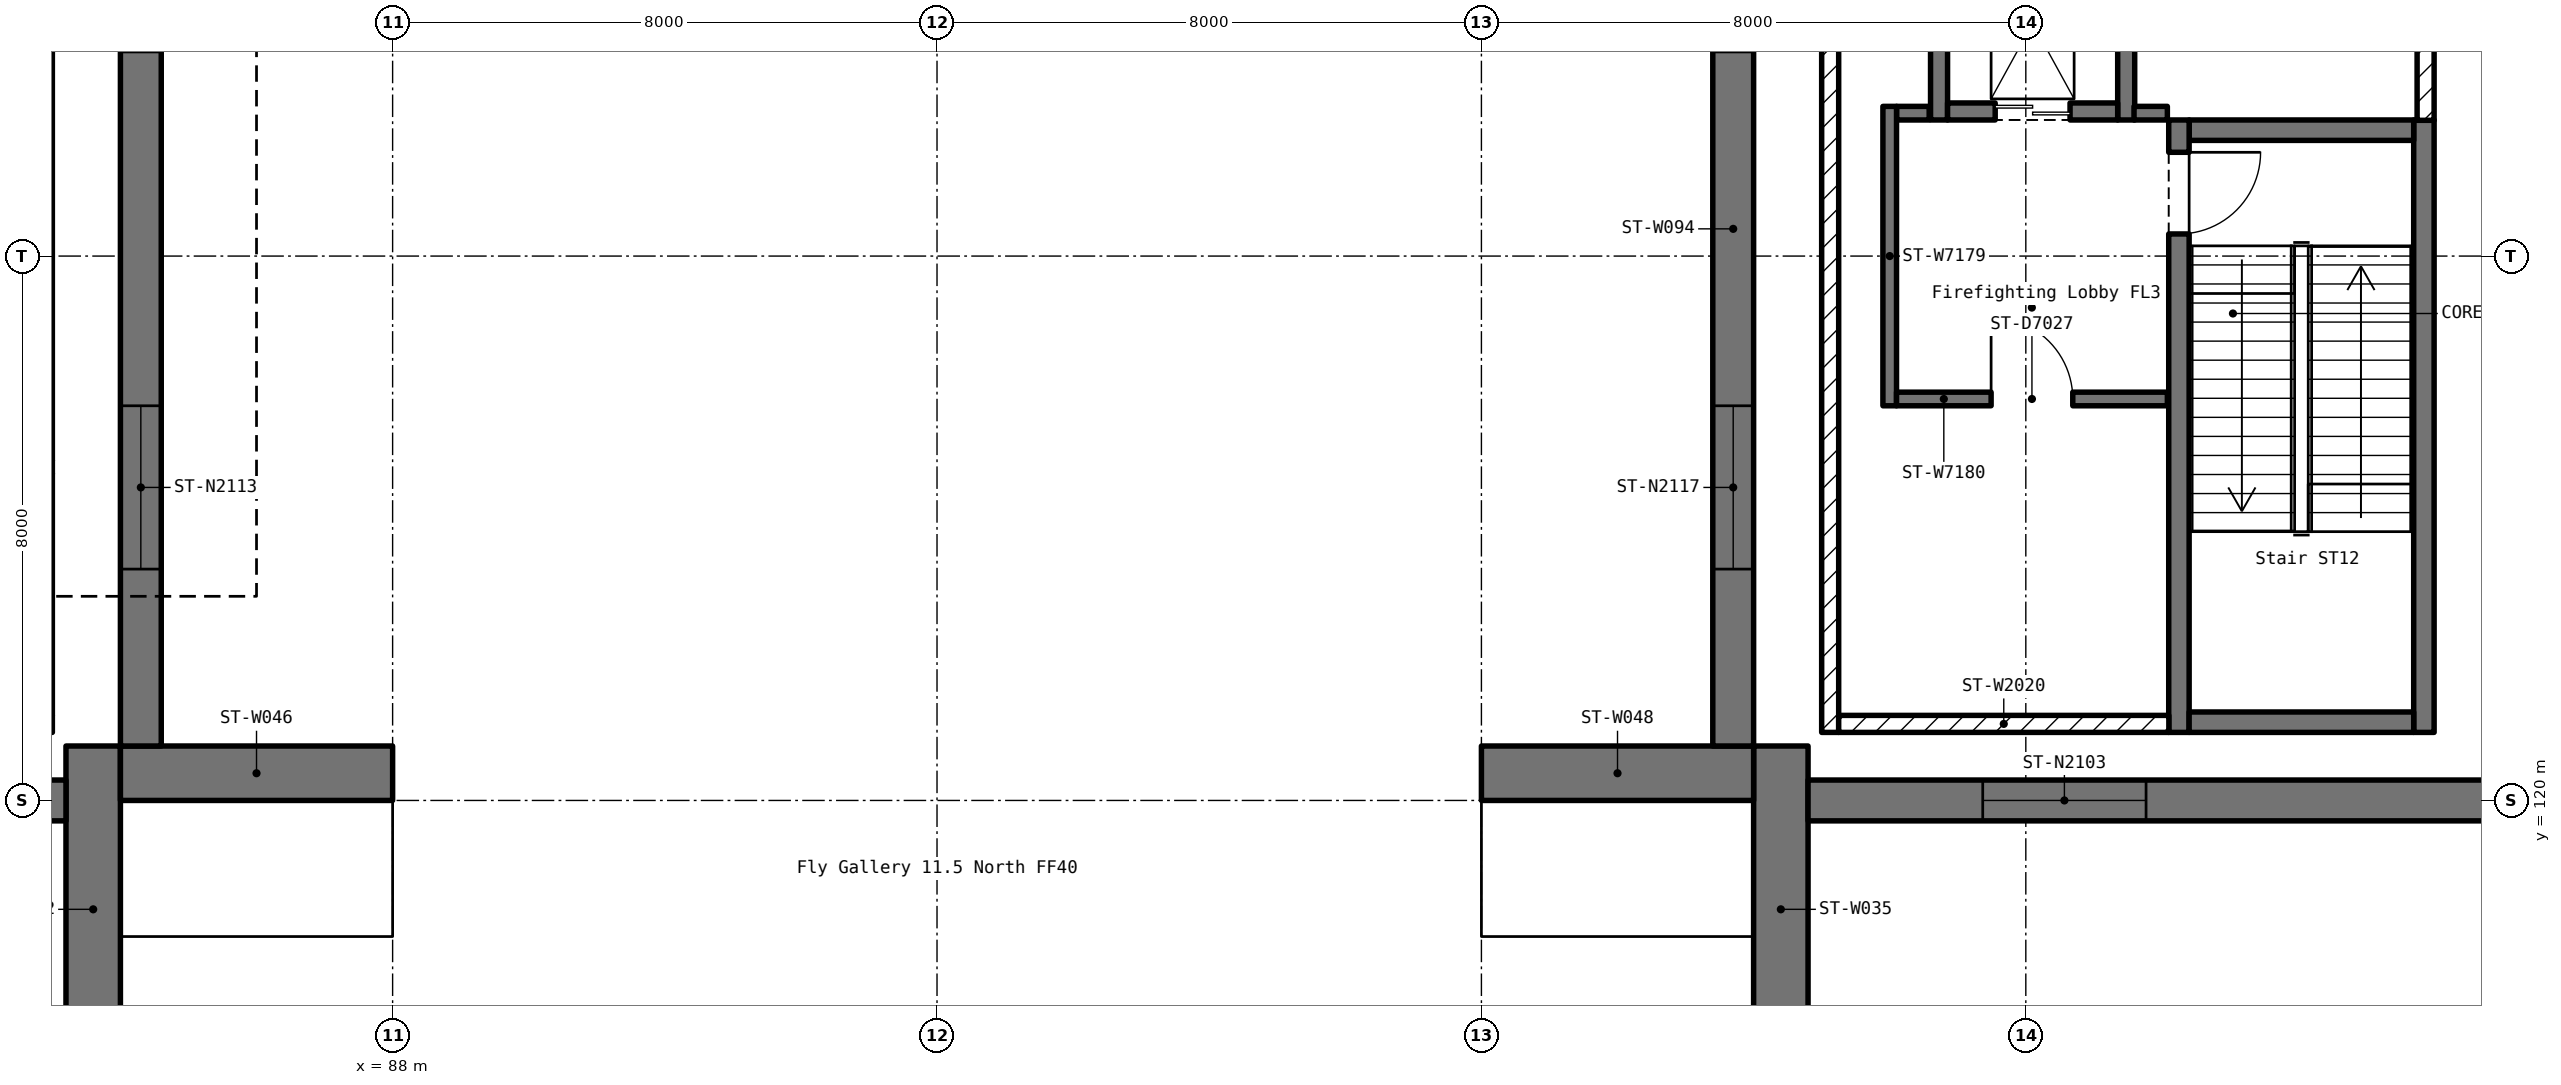
"""IFC4 building model, lengths in metres.
Left out: names, types, materials, properties, quantities, classifications, styles, units other than length and angle.
Written with IfcOpenShell. Run it as: python <this file> out.ifc"""

import sys

from ifc_helpers import new_model, si_unit, direction, frame, frame_2d, origin, place, context, subcontext, project, spatial, rectangle, extrude, element, fill, save


model = new_model("IFC4")
c1 = context("Model", 3, precision=1e-05, world=origin(), true_north=direction((0.0, 1.0)))
c2 = subcontext(c1, "Body", "Model", "MODEL_VIEW")
j1 = project(units=[si_unit("LENGTHUNIT", "METRE"), si_unit("PLANEANGLEUNIT", "RADIAN")], contexts=[c1])
p1 = place(None, origin())
s1 = spatial("IfcSite", under=j1, at=p1, CompositionType="ELEMENT")
p2 = place(p1, origin())
s2 = spatial("IfcBuilding", under=s1, at=p2, CompositionType="ELEMENT")
p3 = place(p2, frame((0.0, 0.0, 11.5)))
s3 = spatial("IfcBuildingStorey", under=s2, at=p3, CompositionType="ELEMENT", Elevation=11.5)
for number, where, z_axis, x_axis in (
    (1, (83.6, 116.0, 0.0), (0.0, 0.0, 1.0), (0.0, 1.0, 0.0)),
    (2, (108.4, 116.0, 0.0), (0.0, 0.0, 1.0), (0.0, 1.0, 0.0)),
):
    element("IfcWall", number, at=place(p3, frame(where, z_axis=z_axis, x_axis=x_axis)), inside=s3, PredefinedType="SHEAR", context=c2, shape_type="SweptSolid", body=[
        extrude(rectangle(XDim=4.8, YDim=0.8, at=frame_2d((2.4, 0.0))), origin(), (0.0, 0.0, 1.0), 5.5),
    ])
p4 = place(p3, frame((84.0, 120.4, 0.0), z_axis=(0.0, 0.0, 1.0), x_axis=(1.0, 0.0, 0.0)))
e3 = element("IfcWall", 3, at=p4, inside=s3, PredefinedType="SHEAR", context=c2, shape_type="SweptSolid", body=[
    extrude(rectangle(XDim=4.0, YDim=0.8, at=frame_2d((2.0, 0.0))), origin(), (0.0, 0.0, 1.0), 5.5),
])
p5 = place(p3, frame((88.0, 120.4, 5.1), z_axis=(0.0, 0.0, 1.0), x_axis=(1.0, 0.0, 0.0)))
e4 = element("IfcWall", 4, at=p5, inside=s3, PredefinedType="SHEAR", context=c2, shape_type="SweptSolid", body=[
    extrude(rectangle(XDim=16.0, YDim=0.8, at=frame_2d((8.0, 0.0))), origin(), (0.0, 0.0, 1.0), 0.4),
])
p6 = place(p3, frame((104.0, 120.4, 0.0), z_axis=(0.0, 0.0, 1.0), x_axis=(1.0, 0.0, 0.0)))
e5 = element("IfcWall", 5, at=p6, inside=s3, PredefinedType="SHEAR", context=c2, shape_type="SweptSolid", body=[
    extrude(rectangle(XDim=4.0, YDim=0.8, at=frame_2d((2.0, 0.0))), origin(), (0.0, 0.0, 1.0), 5.5),
])
p7 = place(p3, frame((60.6, 120.0, 0.0), z_axis=(0.0, 0.0, 1.0), x_axis=(1.0, 0.0, 0.0)))
e6 = element("IfcWall", 6, at=p7, inside=s3, PredefinedType="SHEAR", context=c2, shape_type="SweptSolid", body=[
    extrude(rectangle(XDim=22.6, YDim=0.6, at=frame_2d((11.3, 0.0))), origin(), (0.0, 0.0, 1.0), 5.5),
])
p8 = place(p7, frame((2.567, 0.0, 1.4)))
e7 = element("IfcOpeningElement", 7, at=p8, cuts=e6, PredefinedType="OPENING", context=c2, shape_type="SweptSolid", body=[
    extrude(rectangle(XDim=2.4, YDim=1.0, at=frame_2d((1.2, 0.5))), frame((0.0, 0.312, 0.0), z_axis=(0.0, -1.0, 0.0), x_axis=(1.0, 0.0, 0.0)), (0.0, 0.0, 1.0), 0.624),
])
p9 = place(p7, frame((10.1, 0.0, 1.4)))
e8 = element("IfcOpeningElement", 8, at=p9, cuts=e6, PredefinedType="OPENING", context=c2, shape_type="SweptSolid", body=[
    extrude(rectangle(XDim=2.4, YDim=1.0, at=frame_2d((1.2, 0.5))), frame((0.0, 0.312, 0.0), z_axis=(0.0, -1.0, 0.0), x_axis=(1.0, 0.0, 0.0)), (0.0, 0.0, 1.0), 0.624),
])
p10 = place(p7, frame((17.633, 0.0, 1.4)))
e9 = element("IfcOpeningElement", 9, at=p10, cuts=e6, PredefinedType="OPENING", context=c2, shape_type="SweptSolid", body=[
    extrude(rectangle(XDim=2.4, YDim=1.0, at=frame_2d((1.2, 0.5))), frame((0.0, 0.312, 0.0), z_axis=(0.0, -1.0, 0.0), x_axis=(1.0, 0.0, 0.0)), (0.0, 0.0, 1.0), 0.624),
])
p11 = place(p3, frame((108.8, 120.0, 0.0), z_axis=(0.0, 0.0, 1.0), x_axis=(1.0, 0.0, 0.0)))
e10 = element("IfcWall", 10, at=p11, inside=s3, PredefinedType="SHEAR", context=c2, shape_type="SweptSolid", body=[
    extrude(rectangle(XDim=22.6, YDim=0.6, at=frame_2d((11.3, 0.0))), origin(), (0.0, 0.0, 1.0), 5.5),
])
p12 = place(p11, frame((2.567, 0.0, 1.4)))
e11 = element("IfcOpeningElement", 11, at=p12, cuts=e10, PredefinedType="OPENING", context=c2, shape_type="SweptSolid", body=[
    extrude(rectangle(XDim=2.4, YDim=1.0, at=frame_2d((1.2, 0.5))), frame((0.0, 0.312, 0.0), z_axis=(0.0, -1.0, 0.0), x_axis=(1.0, 0.0, 0.0)), (0.0, 0.0, 1.0), 0.624),
])
p13 = place(p11, frame((10.1, 0.0, 1.4)))
e12 = element("IfcOpeningElement", 12, at=p13, cuts=e10, PredefinedType="OPENING", context=c2, shape_type="SweptSolid", body=[
    extrude(rectangle(XDim=2.4, YDim=1.0, at=frame_2d((1.2, 0.5))), frame((0.0, 0.312, 0.0), z_axis=(0.0, -1.0, 0.0), x_axis=(1.0, 0.0, 0.0)), (0.0, 0.0, 1.0), 0.624),
])
p14 = place(p11, frame((17.633, 0.0, 1.4)))
e13 = element("IfcOpeningElement", 13, at=p14, cuts=e10, PredefinedType="OPENING", context=c2, shape_type="SweptSolid", body=[
    extrude(rectangle(XDim=2.4, YDim=1.0, at=frame_2d((1.2, 0.5))), frame((0.0, 0.312, 0.0), z_axis=(0.0, -1.0, 0.0), x_axis=(1.0, 0.0, 0.0)), (0.0, 0.0, 1.0), 0.624),
])
p15 = place(p3, frame((84.3, 120.8, 0.0), z_axis=(0.0, 0.0, 1.0), x_axis=(0.0, 1.0, 0.0)))
e14 = element("IfcWall", 14, at=p15, inside=s3, PredefinedType="SHEAR", context=c2, shape_type="SweptSolid", body=[
    extrude(rectangle(XDim=15.2, YDim=0.6, at=frame_2d((7.6, 0.0))), origin(), (0.0, 0.0, 1.0), 5.5),
])
p16 = place(p15, frame((2.6, 0.0, 1.4)))
e15 = element("IfcOpeningElement", 15, at=p16, cuts=e14, PredefinedType="OPENING", context=c2, shape_type="SweptSolid", body=[
    extrude(rectangle(XDim=2.4, YDim=1.0, at=frame_2d((1.2, 0.5))), frame((0.0, 0.312, 0.0), z_axis=(0.0, -1.0, 0.0), x_axis=(1.0, 0.0, 0.0)), (0.0, 0.0, 1.0), 0.624),
])
p17 = place(p15, frame((10.2, 0.0, 1.4)))
e16 = element("IfcOpeningElement", 16, at=p17, cuts=e14, PredefinedType="OPENING", context=c2, shape_type="SweptSolid", body=[
    extrude(rectangle(XDim=2.4, YDim=1.0, at=frame_2d((1.2, 0.5))), frame((0.0, 0.312, 0.0), z_axis=(0.0, -1.0, 0.0), x_axis=(1.0, 0.0, 0.0)), (0.0, 0.0, 1.0), 0.624),
])
p18 = place(p3, frame((107.7, 120.8, 0.0), z_axis=(0.0, 0.0, 1.0), x_axis=(0.0, 1.0, 0.0)))
e17 = element("IfcWall", 17, at=p18, inside=s3, PredefinedType="SHEAR", context=c2, shape_type="SweptSolid", body=[
    extrude(rectangle(XDim=15.2, YDim=0.6, at=frame_2d((7.6, 0.0))), origin(), (0.0, 0.0, 1.0), 5.5),
])
p19 = place(p18, frame((2.6, 0.0, 1.4)))
e18 = element("IfcOpeningElement", 18, at=p19, cuts=e17, PredefinedType="OPENING", context=c2, shape_type="SweptSolid", body=[
    extrude(rectangle(XDim=2.4, YDim=1.0, at=frame_2d((1.2, 0.5))), frame((0.0, 0.312, 0.0), z_axis=(0.0, -1.0, 0.0), x_axis=(1.0, 0.0, 0.0)), (0.0, 0.0, 1.0), 0.624),
])
p20 = place(p18, frame((10.2, 0.0, 1.4)))
e19 = element("IfcOpeningElement", 19, at=p20, cuts=e17, PredefinedType="OPENING", context=c2, shape_type="SweptSolid", body=[
    extrude(rectangle(XDim=2.4, YDim=1.0, at=frame_2d((1.2, 0.5))), frame((0.0, 0.312, 0.0), z_axis=(0.0, -1.0, 0.0), x_axis=(1.0, 0.0, 0.0)), (0.0, 0.0, 1.0), 0.624),
])
p21 = place(p3, frame((117.85, 121.0, 0.0), z_axis=(0.0, 0.0, 1.0), x_axis=(0.0, 1.0, 0.0)))
e20 = element("IfcWall", 20, at=p21, inside=s3, PredefinedType="SOLIDWALL", context=c2, shape_type="SweptSolid", body=[
    extrude(rectangle(XDim=9.0, YDim=0.3, at=frame_2d((4.5, 0.0))), origin(), (0.0, 0.0, 1.0), 5.5),
])
p22 = place(p3, frame((117.7, 129.85, 0.0), z_axis=(0.0, 0.0, 1.0), x_axis=(-1.0, 0.0, 0.0)))
e21 = element("IfcWall", 21, at=p22, inside=s3, PredefinedType="SOLIDWALL", context=c2, shape_type="SweptSolid", body=[
    extrude(rectangle(XDim=3.3, YDim=0.3, at=frame_2d((1.65, 0.0))), origin(), (0.0, 0.0, 1.0), 5.5),
])
p23 = place(p3, frame((114.25, 130.0, 0.0), z_axis=(0.0, 0.0, 1.0), x_axis=(0.0, -1.0, 0.0)))
e22 = element("IfcWall", 22, at=p23, inside=s3, PredefinedType="SOLIDWALL", context=c2, shape_type="SweptSolid", body=[
    extrude(rectangle(XDim=9.0, YDim=0.3, at=frame_2d((4.5, 0.0))), origin(), (0.0, 0.0, 1.0), 5.5),
])
p24 = place(p23, frame((0.475, 0.0, 0.0)))
e23 = element("IfcOpeningElement", 23, at=p24, cuts=e22, PredefinedType="OPENING", context=c2, shape_type="SweptSolid", body=[
    extrude(rectangle(XDim=1.2, YDim=2.1, at=frame_2d((0.6, 1.05))), frame((0.0, 0.162, 0.0), z_axis=(0.0, -1.0, 0.0), x_axis=(1.0, 0.0, 0.0)), (0.0, 0.0, 1.0), 0.324),
])
p25 = place(p3, frame((114.4, 121.15, 0.0), z_axis=(0.0, 0.0, 1.0), x_axis=(1.0, 0.0, 0.0)))
e24 = element("IfcWall", 24, at=p25, inside=s3, PredefinedType="SOLIDWALL", context=c2, shape_type="SweptSolid", body=[
    extrude(rectangle(XDim=3.3, YDim=0.3, at=frame_2d((1.65, 0.0))), origin(), (0.0, 0.0, 1.0), 5.5),
])
for number, where, z_axis, x_axis in (
    (25, (113.475, 130.0, 0.0), (0.0, 0.0, 1.0), (0.0, 1.0, 0.0)),
    (26, (110.725, 134.0, 0.0), (0.0, 0.0, 1.0), (0.0, -1.0, 0.0)),
):
    element("IfcWall", number, at=place(p3, frame(where, z_axis=z_axis, x_axis=x_axis)), inside=s3, PredefinedType="SOLIDWALL", context=c2, shape_type="SweptSolid", body=[
        extrude(rectangle(XDim=4.0, YDim=0.25, at=frame_2d((2.0, 0.0))), origin(), (0.0, 0.0, 1.0), 5.5),
    ])
p26 = place(p3, frame((110.85, 130.125, 0.0), z_axis=(0.0, 0.0, 1.0), x_axis=(1.0, 0.0, 0.0)))
e27 = element("IfcWall", 27, at=p26, inside=s3, PredefinedType="SOLIDWALL", context=c2, shape_type="SweptSolid", body=[
    extrude(rectangle(XDim=2.5, YDim=0.25, at=frame_2d((1.25, 0.0))), origin(), (0.0, 0.0, 1.0), 5.5),
])
p27 = place(p26, frame((0.7, 0.0, 0.0)))
e28 = element("IfcOpeningElement", 28, at=p27, cuts=e27, PredefinedType="OPENING", context=c2, shape_type="SweptSolid", body=[
    extrude(rectangle(XDim=1.1, YDim=2.1, at=frame_2d((0.55, 1.05))), frame((0.0, 0.137, 0.0), z_axis=(0.0, -1.0, 0.0), x_axis=(1.0, 0.0, 0.0)), (0.0, 0.0, 1.0), 0.274),
])
p28 = place(p3, frame((114.08, 130.1, 0.0), z_axis=(0.0, 0.0, 1.0), x_axis=(-1.0, 0.0, 0.0)))
e29 = element("IfcWall", 29, at=p28, inside=s3, PredefinedType="PARTITIONING", context=c2, shape_type="SweptSolid", body=[
    extrude(rectangle(XDim=0.49, YDim=0.2, at=frame_2d((0.245, 0.0))), origin(), (0.0, 0.0, 1.0), 5.28),
])
p29 = place(p3, frame((110.58, 130.1, 0.0), z_axis=(0.0, 0.0, 1.0), x_axis=(-1.0, 0.0, 0.0)))
e30 = element("IfcWall", 30, at=p29, inside=s3, PredefinedType="PARTITIONING", context=c2, shape_type="SweptSolid", body=[
    extrude(rectangle(XDim=0.48, YDim=0.2, at=frame_2d((0.24, 0.0))), origin(), (0.0, 0.0, 1.0), 5.28),
])
p30 = place(p3, frame((110.0, 130.2, 0.0), z_axis=(0.0, 0.0, 1.0), x_axis=(0.0, -1.0, 0.0)))
e31 = element("IfcWall", 31, at=p30, inside=s3, PredefinedType="PARTITIONING", context=c2, shape_type="SweptSolid", body=[
    extrude(rectangle(XDim=4.4, YDim=0.2, at=frame_2d((2.2, 0.0))), origin(), (0.0, 0.0, 1.0), 5.28),
])
p31 = place(p3, frame((110.1, 125.9, 0.0), z_axis=(0.0, 0.0, 1.0), x_axis=(1.0, 0.0, 0.0)))
e32 = element("IfcWall", 32, at=p31, inside=s3, PredefinedType="PARTITIONING", context=c2, shape_type="SweptSolid", body=[
    extrude(rectangle(XDim=3.98, YDim=0.2, at=frame_2d((1.99, 0.0))), origin(), (0.0, 0.0, 1.0), 5.28),
])
p32 = place(p31, frame((1.39, 0.0, 0.0)))
e33 = element("IfcOpeningElement", 33, at=p32, cuts=e32, PredefinedType="OPENING", context=c2, shape_type="SweptSolid", body=[
    extrude(rectangle(XDim=1.2, YDim=2.1, at=frame_2d((0.6, 1.05))), frame((0.0, 0.112, 0.0), z_axis=(0.0, -1.0, 0.0), x_axis=(1.0, 0.0, 0.0)), (0.0, 0.0, 1.0), 0.224),
])
p33 = place(p3, frame((117.875, 129.995, 0.0), z_axis=(0.0, 0.0, 1.0), x_axis=(0.0, 1.0, 0.0)))
e34 = element("IfcWall", 34, at=p33, inside=s3, PredefinedType="SOLIDWALL", context=c2, shape_type="SweptSolid", body=[
    extrude(rectangle(XDim=5.005, YDim=0.25, at=frame_2d((2.502, 0.0))), origin(), (0.0, 0.0, 1.0), 5.28),
])
p34 = place(p33, frame((1.43, 0.0, 2.6)))
e35 = element("IfcOpeningElement", 35, at=p34, cuts=e34, PredefinedType="OPENING", context=c2, shape_type="SweptSolid", body=[
    extrude(rectangle(XDim=2.4, YDim=1.2, at=frame_2d((1.2, 0.6))), frame((0.0, 0.137, 0.0), z_axis=(0.0, -1.0, 0.0), x_axis=(1.0, 0.0, 0.0)), (0.0, 0.0, 1.0), 0.274),
])
p35 = place(p3, frame((109.125, 134.75, 0.0), z_axis=(0.0, 0.0, 1.0), x_axis=(0.0, -1.0, 0.0)))
e36 = element("IfcWall", 36, at=p35, inside=s3, PredefinedType="SOLIDWALL", context=c2, shape_type="SweptSolid", body=[
    extrude(rectangle(XDim=13.75, YDim=0.25, at=frame_2d((6.875, 0.0))), origin(), (0.0, 0.0, 1.0), 5.28),
])
p36 = place(p3, frame((109.25, 121.125, 0.0), z_axis=(0.0, 0.0, 1.0), x_axis=(1.0, 0.0, 0.0)))
e37 = element("IfcWall", 37, at=p36, inside=s3, PredefinedType="SOLIDWALL", context=c2, shape_type="SweptSolid", body=[
    extrude(rectangle(XDim=4.852, YDim=0.25, at=frame_2d((2.426, 0.0))), origin(), (0.0, 0.0, 1.0), 5.28),
])
p37 = place(p12, origin())
e38 = element("IfcWindow", 38, at=p37, inside=s3, PartitioningType="SINGLE_PANEL", PredefinedType="WINDOW", context=c2, shape_type="SweptSolid", body=[
    extrude(rectangle(XDim=2.4, YDim=1.0, at=frame_2d((1.2, 0.5))), frame((0.0, 0.03, 0.0), z_axis=(0.0, -1.0, 0.0), x_axis=(1.0, 0.0, 0.0)), (0.0, 0.0, 1.0), 0.06),
])
fill(e11, e38)
p38 = place(p16, origin())
e39 = element("IfcWindow", 39, at=p38, inside=s3, PartitioningType="SINGLE_PANEL", PredefinedType="WINDOW", context=c2, shape_type="SweptSolid", body=[
    extrude(rectangle(XDim=2.4, YDim=1.0, at=frame_2d((1.2, 0.5))), frame((0.0, 0.03, 0.0), z_axis=(0.0, -1.0, 0.0), x_axis=(1.0, 0.0, 0.0)), (0.0, 0.0, 1.0), 0.06),
])
fill(e15, e39)
p39 = place(p19, origin())
e40 = element("IfcWindow", 40, at=p39, inside=s3, PartitioningType="SINGLE_PANEL", PredefinedType="WINDOW", context=c2, shape_type="SweptSolid", body=[
    extrude(rectangle(XDim=2.4, YDim=1.0, at=frame_2d((1.2, 0.5))), frame((0.0, 0.03, 0.0), z_axis=(0.0, -1.0, 0.0), x_axis=(1.0, 0.0, 0.0)), (0.0, 0.0, 1.0), 0.06),
])
fill(e18, e40)
p40 = place(p24, origin())
e41 = element("IfcDoor", 41, at=p40, inside=s3, OperationType="SINGLE_SWING_LEFT", PredefinedType="DOOR", context=c2, shape_type="SweptSolid", body=[
    extrude(rectangle(XDim=1.2, YDim=2.1, at=frame_2d((0.6, 1.05))), frame((0.0, 0.025, 0.0), z_axis=(0.0, -1.0, 0.0), x_axis=(1.0, 0.0, 0.0)), (0.0, 0.0, 1.0), 0.05),
])
fill(e23, e41)
p41 = place(p27, origin())
e42 = element("IfcDoor", 42, at=p41, inside=s3, OperationType="DOUBLE_DOOR_SLIDING", PredefinedType="DOOR", context=c2, shape_type="SweptSolid", body=[
    extrude(rectangle(XDim=1.1, YDim=2.1, at=frame_2d((0.55, 1.05))), frame((0.0, 0.025, 0.0), z_axis=(0.0, -1.0, 0.0), x_axis=(1.0, 0.0, 0.0)), (0.0, 0.0, 1.0), 0.05),
])
fill(e28, e42)
p42 = place(p32, origin())
e43 = element("IfcDoor", 43, at=p42, inside=s3, OperationType="SINGLE_SWING_LEFT", PredefinedType="DOOR", context=c2, shape_type="SweptSolid", body=[
    extrude(rectangle(XDim=1.2, YDim=2.1, at=frame_2d((0.6, 1.05))), frame((0.0, 0.025, 0.0), z_axis=(0.0, -1.0, 0.0), x_axis=(1.0, 0.0, 0.0)), (0.0, 0.0, 1.0), 0.05),
])
fill(e33, e43)
save(model, sys.argv[1])
